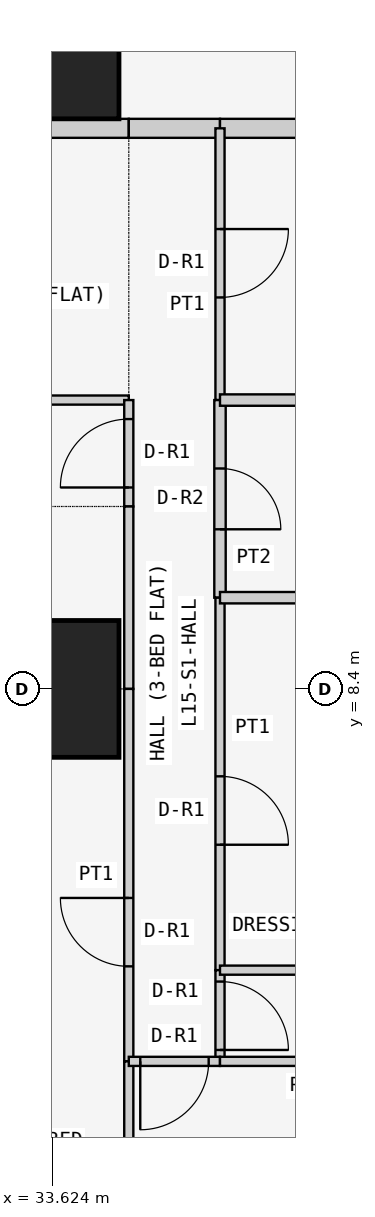
"""IFC4 building model, lengths in metres.
Left out: names, types, materials, properties, quantities, classifications, styles, units other than length and angle.
Written with IfcOpenShell. Run it as: python <this file> out.ifc"""

import sys

from ifc_helpers import new_model, si_unit, direction, frame, frame_2d, origin, origin_2d, place, context, subcontext, project, spatial, rectangle, extrude, element, fill, save


model = new_model("IFC4")
c1 = context("Model", 3, precision=1e-05, world=origin(), true_north=direction((0.0, 1.0)))
c2 = subcontext(c1, "Body", "Model", "MODEL_VIEW")
j1 = project(units=[si_unit("LENGTHUNIT", "METRE"), si_unit("PLANEANGLEUNIT", "RADIAN")], contexts=[c1])
p1 = place(None, origin())
s1 = spatial("IfcSite", under=j1, at=p1, CompositionType="ELEMENT")
p2 = place(p1, origin())
s2 = spatial("IfcBuilding", under=s1, at=p2, CompositionType="ELEMENT")
p3 = place(p2, frame((0.0, 0.0, 63.3)))
s3 = spatial("IfcBuildingStorey", under=s2, at=p3, CompositionType="ELEMENT", Elevation=63.3)
for number, where, z_axis, x_axis in (
    (1, (33.6, 8.4, 0.0), (0.0, 0.0, 1.0), (1.0, 0.0, 0.0)),
    (2, (33.6, 16.8, 0.0), (0.0, 0.0, 1.0), (1.0, 0.0, 0.0)),
):
    element("IfcColumn", number, at=place(p3, frame(where, z_axis=z_axis, x_axis=x_axis)), inside=s3, PredefinedType="COLUMN", context=c2, shape_type="SweptSolid", body=[
        extrude(rectangle(XDim=1.8, YDim=1.8, at=origin_2d()), origin(), (0.0, 0.0, 1.0), 3.6),
    ])
p4 = place(p3, frame((34.629, 15.775, 0.0), z_axis=(0.0, 0.0, 1.0), x_axis=(-1.0, 0.0, 0.0)))
e3 = element("IfcWall", 3, at=p4, inside=s3, PredefinedType="PARTITIONING", context=c2, shape_type="SweptSolid", body=[
    extrude(rectangle(XDim=5.229, YDim=0.25, at=frame_2d((2.615, 0.0))), origin(), (0.0, 0.0, 1.0), 3.45),
])
p5 = place(p4, frame((2.129, 0.0, 0.0)))
e4 = element("IfcOpeningElement", 4, at=p5, cuts=e3, PredefinedType="OPENING", context=c2, shape_type="SweptSolid", body=[
    extrude(rectangle(XDim=1.0, YDim=2.1, at=frame_2d((0.5, 1.05))), frame((0.0, 0.135, 0.0), z_axis=(0.0, -1.0, 0.0), x_axis=(1.0, 0.0, 0.0)), (0.0, 0.0, 1.0), 0.27),
])
p6 = place(p3, frame((35.829, 15.775, 0.0), z_axis=(0.0, 0.0, 1.0), x_axis=(-1.0, 0.0, 0.0)))
e5 = element("IfcWall", 5, at=p6, inside=s3, PredefinedType="PARTITIONING", context=c2, shape_type="SweptSolid", body=[
    extrude(rectangle(XDim=1.2, YDim=0.25, at=frame_2d((0.6, 0.0))), origin(), (0.0, 0.0, 1.0), 3.45),
])
p7 = place(p3, frame((42.7, 15.775, 0.0), z_axis=(0.0, 0.0, 1.0), x_axis=(-1.0, 0.0, 0.0)))
e6 = element("IfcWall", 6, at=p7, inside=s3, PredefinedType="PARTITIONING", context=c2, shape_type="SweptSolid", body=[
    extrude(rectangle(XDim=6.871, YDim=0.25, at=frame_2d((3.436, 0.0))), origin(), (0.0, 0.0, 1.0), 3.45),
])
p8 = place(p3, frame((29.4, 12.2, 0.0), z_axis=(0.0, 0.0, 1.0), x_axis=(1.0, 0.0, 0.0)))
e7 = element("IfcWall", 7, at=p8, inside=s3, PredefinedType="PARTITIONING", context=c2, shape_type="SweptSolid", body=[
    extrude(rectangle(XDim=5.229, YDim=0.12, at=frame_2d((2.615, 0.0))), origin(), (0.0, 0.0, 1.0), 3.45),
])
p9 = place(p3, frame((34.629, 10.8, 0.0), z_axis=(0.0, 0.0, 1.0), x_axis=(0.0, 1.0, 0.0)))
e8 = element("IfcWall", 8, at=p9, inside=s3, PredefinedType="PARTITIONING", context=c2, shape_type="SweptSolid", body=[
    extrude(rectangle(XDim=1.4, YDim=0.12, at=frame_2d((0.7, 0.0))), origin(), (0.0, 0.0, 1.0), 3.45),
])
p10 = place(p9, frame((0.25, 0.0, 0.0)))
e9 = element("IfcOpeningElement", 9, at=p10, cuts=e8, PredefinedType="OPENING", context=c2, shape_type="SweptSolid", body=[
    extrude(rectangle(XDim=0.9, YDim=2.1, at=frame_2d((0.45, 1.05))), frame((0.0, 0.07, 0.0), z_axis=(0.0, -1.0, 0.0), x_axis=(1.0, 0.0, 0.0)), (0.0, 0.0, 1.0), 0.14),
])
p11 = place(p3, frame((34.629, 8.4, 0.0), z_axis=(0.0, 0.0, 1.0), x_axis=(0.0, 1.0, 0.0)))
e10 = element("IfcWall", 10, at=p11, inside=s3, PredefinedType="PARTITIONING", context=c2, shape_type="SweptSolid", body=[
    extrude(rectangle(XDim=2.4, YDim=0.12, at=frame_2d((1.2, 0.0))), origin(), (0.0, 0.0, 1.0), 3.45),
])
p12 = place(p3, frame((34.629, 3.5, 0.0), z_axis=(0.0, 0.0, 1.0), x_axis=(0.0, 1.0, 0.0)))
e11 = element("IfcWall", 11, at=p12, inside=s3, PredefinedType="PARTITIONING", context=c2, shape_type="SweptSolid", body=[
    extrude(rectangle(XDim=4.9, YDim=0.12, at=frame_2d((2.45, 0.0))), origin(), (0.0, 0.0, 1.0), 3.45),
])
p13 = place(p12, frame((1.25, 0.0, 0.0)))
e12 = element("IfcOpeningElement", 12, at=p13, cuts=e11, PredefinedType="OPENING", context=c2, shape_type="SweptSolid", body=[
    extrude(rectangle(XDim=0.9, YDim=2.1, at=frame_2d((0.45, 1.05))), frame((0.0, 0.07, 0.0), z_axis=(0.0, -1.0, 0.0), x_axis=(1.0, 0.0, 0.0)), (0.0, 0.0, 1.0), 0.14),
])
p14 = place(p3, frame((34.629, -0.65, 0.0), z_axis=(0.0, 0.0, 1.0), x_axis=(0.0, 1.0, 0.0)))
e13 = element("IfcWall", 13, at=p14, inside=s3, PredefinedType="PARTITIONING", context=c2, shape_type="SweptSolid", body=[
    extrude(rectangle(XDim=4.15, YDim=0.12, at=frame_2d((2.075, 0.0))), origin(), (0.0, 0.0, 1.0), 3.45),
])
p15 = place(p3, frame((35.829, 12.2, 0.0), z_axis=(0.0, 0.0, 1.0), x_axis=(0.0, 1.0, 0.0)))
e14 = element("IfcWall", 14, at=p15, inside=s3, PredefinedType="PARTITIONING", context=c2, shape_type="SweptSolid", body=[
    extrude(rectangle(XDim=3.575, YDim=0.12, at=frame_2d((1.788, 0.0))), origin(), (0.0, 0.0, 1.0), 3.45),
])
p16 = place(p15, frame((1.35, 0.0, 0.0)))
e15 = element("IfcOpeningElement", 15, at=p16, cuts=e14, PredefinedType="OPENING", context=c2, shape_type="SweptSolid", body=[
    extrude(rectangle(XDim=0.9, YDim=2.1, at=frame_2d((0.45, 1.05))), frame((0.0, 0.07, 0.0), z_axis=(0.0, -1.0, 0.0), x_axis=(1.0, 0.0, 0.0)), (0.0, 0.0, 1.0), 0.14),
])
p17 = place(p3, frame((35.829, 9.6, 0.0), z_axis=(0.0, 0.0, 1.0), x_axis=(0.0, 1.0, 0.0)))
e16 = element("IfcWall", 16, at=p17, inside=s3, PredefinedType="PARTITIONING", context=c2, shape_type="SweptSolid", body=[
    extrude(rectangle(XDim=2.6, YDim=0.15, at=frame_2d((1.3, 0.0))), origin(), (0.0, 0.0, 1.0), 3.45),
])
p18 = place(p17, frame((0.9, 0.0, 0.0)))
e17 = element("IfcOpeningElement", 17, at=p18, cuts=e16, PredefinedType="OPENING", context=c2, shape_type="SweptSolid", body=[
    extrude(rectangle(XDim=0.8, YDim=2.1, at=frame_2d((0.4, 1.05))), frame((0.0, 0.085, 0.0), z_axis=(0.0, -1.0, 0.0), x_axis=(1.0, 0.0, 0.0)), (0.0, 0.0, 1.0), 0.17),
])
p19 = place(p3, frame((35.829, 4.7, 0.0), z_axis=(0.0, 0.0, 1.0), x_axis=(0.0, 1.0, 0.0)))
e18 = element("IfcWall", 18, at=p19, inside=s3, PredefinedType="PARTITIONING", context=c2, shape_type="SweptSolid", body=[
    extrude(rectangle(XDim=4.9, YDim=0.12, at=frame_2d((2.45, 0.0))), origin(), (0.0, 0.0, 1.0), 3.45),
])
p20 = place(p19, frame((1.65, 0.0, 0.0)))
e19 = element("IfcOpeningElement", 19, at=p20, cuts=e18, PredefinedType="OPENING", context=c2, shape_type="SweptSolid", body=[
    extrude(rectangle(XDim=0.9, YDim=2.1, at=frame_2d((0.45, 1.05))), frame((0.0, 0.07, 0.0), z_axis=(0.0, -1.0, 0.0), x_axis=(1.0, 0.0, 0.0)), (0.0, 0.0, 1.0), 0.14),
])
p21 = place(p3, frame((35.829, 3.5, 0.0), z_axis=(0.0, 0.0, 1.0), x_axis=(0.0, 1.0, 0.0)))
e20 = element("IfcWall", 20, at=p21, inside=s3, PredefinedType="PARTITIONING", context=c2, shape_type="SweptSolid", body=[
    extrude(rectangle(XDim=1.2, YDim=0.12, at=frame_2d((0.6, 0.0))), origin(), (0.0, 0.0, 1.0), 3.45),
])
p22 = place(p21, frame((0.15, 0.0, 0.0)))
e21 = element("IfcOpeningElement", 21, at=p22, cuts=e20, PredefinedType="OPENING", context=c2, shape_type="SweptSolid", body=[
    extrude(rectangle(XDim=0.9, YDim=2.1, at=frame_2d((0.45, 1.05))), frame((0.0, 0.07, 0.0), z_axis=(0.0, -1.0, 0.0), x_axis=(1.0, 0.0, 0.0)), (0.0, 0.0, 1.0), 0.14),
])
p23 = place(p3, frame((34.629, 3.5, 0.0), z_axis=(0.0, 0.0, 1.0), x_axis=(1.0, 0.0, 0.0)))
e22 = element("IfcWall", 22, at=p23, inside=s3, PredefinedType="PARTITIONING", context=c2, shape_type="SweptSolid", body=[
    extrude(rectangle(XDim=1.2, YDim=0.12, at=frame_2d((0.6, 0.0))), origin(), (0.0, 0.0, 1.0), 3.45),
])
p24 = place(p23, frame((0.151, 0.0, 0.0)))
e23 = element("IfcOpeningElement", 23, at=p24, cuts=e22, PredefinedType="OPENING", context=c2, shape_type="SweptSolid", body=[
    extrude(rectangle(XDim=0.9, YDim=2.1, at=frame_2d((0.45, 1.05))), frame((0.0, 0.07, 0.0), z_axis=(0.0, -1.0, 0.0), x_axis=(1.0, 0.0, 0.0)), (0.0, 0.0, 1.0), 0.14),
])
for number, where, z_axis, x_axis in (
    (24, (35.829, 12.2, 0.0), (0.0, 0.0, 1.0), (1.0, 0.0, 0.0)),
    (25, (35.829, 9.6, 0.0), (0.0, 0.0, 1.0), (1.0, 0.0, 0.0)),
):
    element("IfcWall", number, at=place(p3, frame(where, z_axis=z_axis, x_axis=x_axis)), inside=s3, PredefinedType="PARTITIONING", context=c2, shape_type="SweptSolid", body=[
        extrude(rectangle(XDim=2.971, YDim=0.15, at=frame_2d((1.485, 0.0))), origin(), (0.0, 0.0, 1.0), 3.45),
    ])
for number, where, z_axis, x_axis in (
    (26, (35.829, 4.7, 0.0), (0.0, 0.0, 1.0), (1.0, 0.0, 0.0)),
    (27, (35.829, 3.5, 0.0), (0.0, 0.0, 1.0), (1.0, 0.0, 0.0)),
):
    element("IfcWall", number, at=place(p3, frame(where, z_axis=z_axis, x_axis=x_axis)), inside=s3, PredefinedType="PARTITIONING", context=c2, shape_type="SweptSolid", body=[
        extrude(rectangle(XDim=2.285, YDim=0.12, at=frame_2d((1.143, 0.0))), origin(), (0.0, 0.0, 1.0), 3.45),
    ])
p25 = place(p10, origin())
e28 = element("IfcDoor", 28, at=p25, inside=s3, OperationType="SINGLE_SWING_LEFT", PredefinedType="DOOR", context=c2, shape_type="SweptSolid", body=[
    extrude(rectangle(XDim=0.9, YDim=2.1, at=frame_2d((0.45, 1.05))), frame((0.0, 0.025, 0.0), z_axis=(0.0, -1.0, 0.0), x_axis=(1.0, 0.0, 0.0)), (0.0, 0.0, 1.0), 0.05),
])
fill(e9, e28)
p26 = place(p13, origin())
e29 = element("IfcDoor", 29, at=p26, inside=s3, OperationType="SINGLE_SWING_RIGHT", PredefinedType="DOOR", context=c2, shape_type="SweptSolid", body=[
    extrude(rectangle(XDim=0.9, YDim=2.1, at=frame_2d((0.45, 1.05))), frame((0.0, 0.025, 0.0), z_axis=(0.0, -1.0, 0.0), x_axis=(1.0, 0.0, 0.0)), (0.0, 0.0, 1.0), 0.05),
])
fill(e12, e29)
p27 = place(p16, frame((0.9, 0.0, 0.0), z_axis=(0.0, 0.0, 1.0), x_axis=(-1.0, 0.0, 0.0)))
e30 = element("IfcDoor", 30, at=p27, inside=s3, OperationType="SINGLE_SWING_LEFT", PredefinedType="DOOR", context=c2, shape_type="SweptSolid", body=[
    extrude(rectangle(XDim=0.9, YDim=2.1, at=frame_2d((0.45, 1.05))), frame((0.0, 0.025, 0.0), z_axis=(0.0, -1.0, 0.0), x_axis=(1.0, 0.0, 0.0)), (0.0, 0.0, 1.0), 0.05),
])
fill(e15, e30)
p28 = place(p18, frame((0.8, 0.0, 0.0), z_axis=(0.0, 0.0, 1.0), x_axis=(-1.0, 0.0, 0.0)))
e31 = element("IfcDoor", 31, at=p28, inside=s3, OperationType="SINGLE_SWING_RIGHT", PredefinedType="DOOR", context=c2, shape_type="SweptSolid", body=[
    extrude(rectangle(XDim=0.8, YDim=2.1, at=frame_2d((0.4, 1.05))), frame((0.0, 0.025, 0.0), z_axis=(0.0, -1.0, 0.0), x_axis=(1.0, 0.0, 0.0)), (0.0, 0.0, 1.0), 0.05),
])
fill(e17, e31)
p29 = place(p20, frame((0.9, 0.0, 0.0), z_axis=(0.0, 0.0, 1.0), x_axis=(-1.0, 0.0, 0.0)))
e32 = element("IfcDoor", 32, at=p29, inside=s3, OperationType="SINGLE_SWING_RIGHT", PredefinedType="DOOR", context=c2, shape_type="SweptSolid", body=[
    extrude(rectangle(XDim=0.9, YDim=2.1, at=frame_2d((0.45, 1.05))), frame((0.0, 0.025, 0.0), z_axis=(0.0, -1.0, 0.0), x_axis=(1.0, 0.0, 0.0)), (0.0, 0.0, 1.0), 0.05),
])
fill(e19, e32)
p30 = place(p22, frame((0.9, 0.0, 0.0), z_axis=(0.0, 0.0, 1.0), x_axis=(-1.0, 0.0, 0.0)))
e33 = element("IfcDoor", 33, at=p30, inside=s3, OperationType="SINGLE_SWING_RIGHT", PredefinedType="DOOR", context=c2, shape_type="SweptSolid", body=[
    extrude(rectangle(XDim=0.9, YDim=2.1, at=frame_2d((0.45, 1.05))), frame((0.0, 0.025, 0.0), z_axis=(0.0, -1.0, 0.0), x_axis=(1.0, 0.0, 0.0)), (0.0, 0.0, 1.0), 0.05),
])
fill(e21, e33)
p31 = place(p24, frame((0.9, 0.0, 0.0), z_axis=(0.0, 0.0, 1.0), x_axis=(-1.0, 0.0, 0.0)))
e34 = element("IfcDoor", 34, at=p31, inside=s3, OperationType="SINGLE_SWING_RIGHT", PredefinedType="DOOR", context=c2, shape_type="SweptSolid", body=[
    extrude(rectangle(XDim=0.9, YDim=2.1, at=frame_2d((0.45, 1.05))), frame((0.0, 0.025, 0.0), z_axis=(0.0, -1.0, 0.0), x_axis=(1.0, 0.0, 0.0)), (0.0, 0.0, 1.0), 0.05),
])
fill(e23, e34)
save(model, sys.argv[1])
